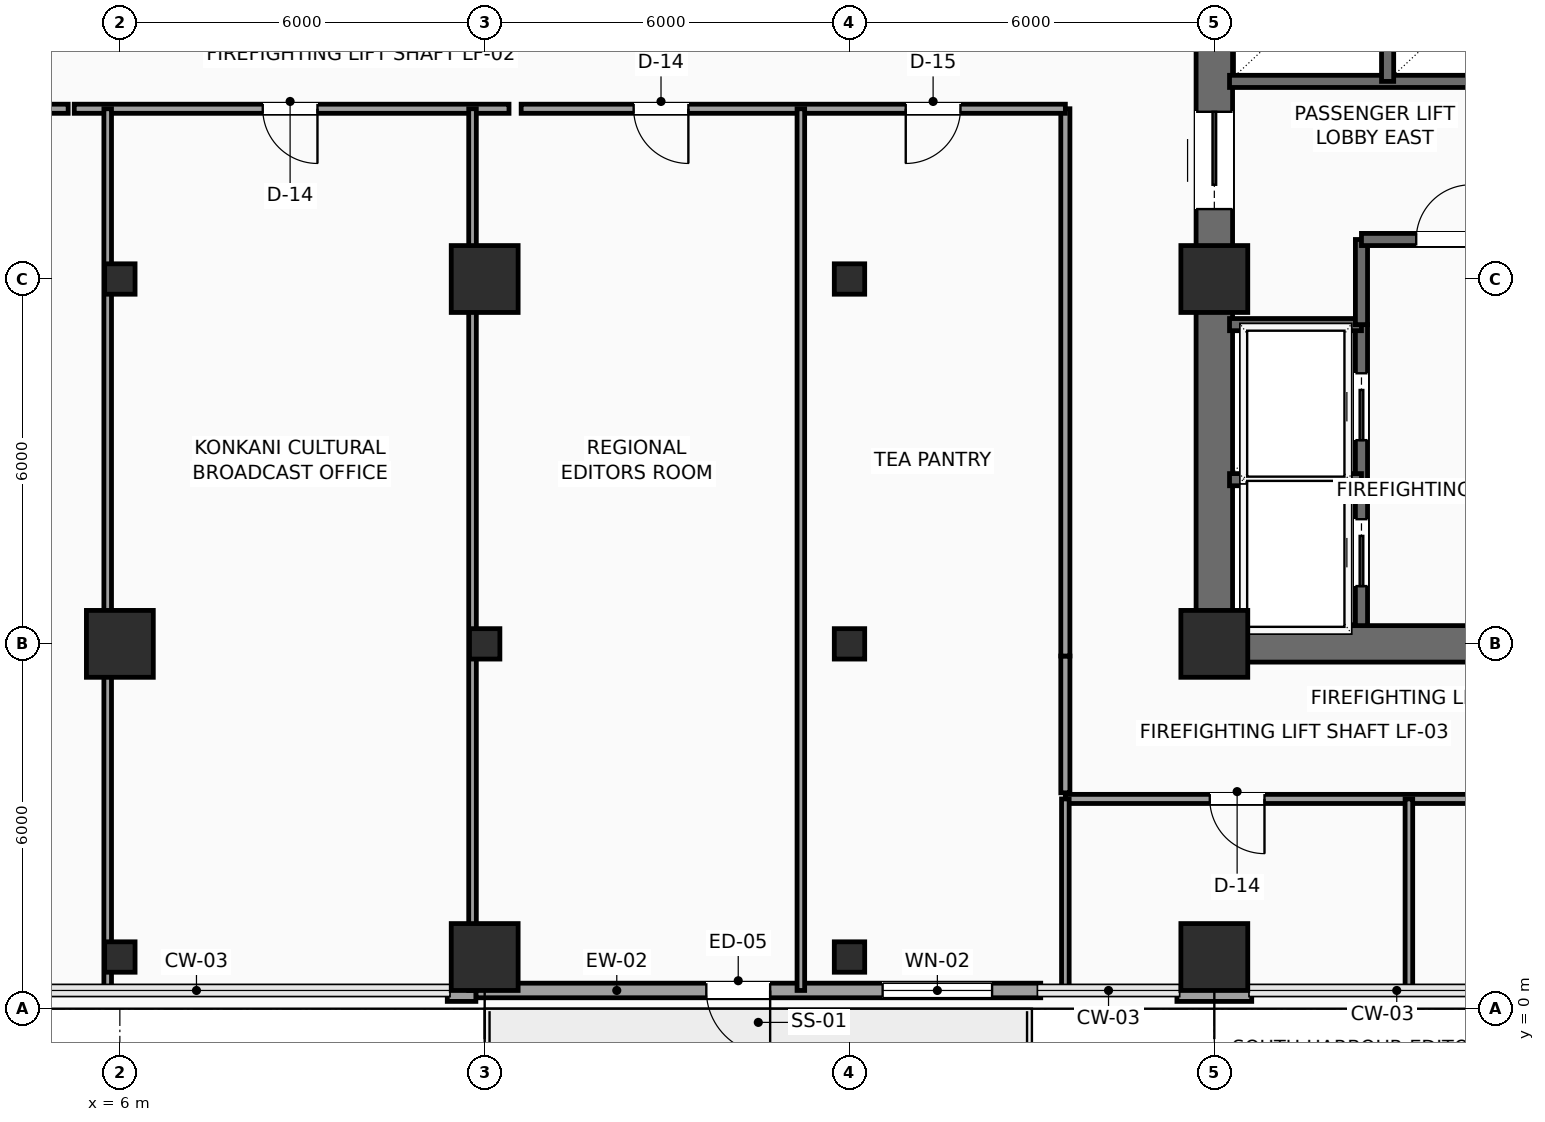
"""IFC4 building model, lengths in metres.
Left out: names, types, materials, properties, quantities, classifications, styles, units other than length and angle.
Written with IfcOpenShell. Run it as: python <this file> out.ifc"""

import sys

from ifc_helpers import new_model, si_unit, direction, frame, frame_2d, origin, origin_2d, place, context, subcontext, project, spatial, rectangle, hollow_rectangle, extrude, element, fill, save


model = new_model("IFC4")
c1 = context("Model", 3, precision=1e-05, world=origin(), true_north=direction((0.0, 1.0)))
c2 = subcontext(c1, "Body", "Model", "MODEL_VIEW")
j1 = project(units=[si_unit("LENGTHUNIT", "METRE"), si_unit("PLANEANGLEUNIT", "RADIAN")], contexts=[c1])
p1 = place(None, origin())
s1 = spatial("IfcSite", under=j1, at=p1, CompositionType="ELEMENT")
p2 = place(p1, origin())
s2 = spatial("IfcBuilding", under=s1, at=p2, CompositionType="ELEMENT")
p3 = place(p2, frame((0.0, 0.0, 99.6)))
s3 = spatial("IfcBuildingStorey", under=s2, at=p3, CompositionType="ELEMENT", Elevation=99.6)
for number, where, z_axis, x_axis in (
    (1, (24.0, 6.0, 0.0), (0.0, 0.0, 1.0), (1.0, 0.0, 0.0)),
    (2, (24.0, 12.0, 0.0), (0.0, 0.0, 1.0), (1.0, 0.0, 0.0)),
):
    element("IfcColumn", number, at=place(p3, frame(where, z_axis=z_axis, x_axis=x_axis)), inside=s3, PredefinedType="COLUMN", context=c2, shape_type="SweptSolid", body=[
        extrude(rectangle(XDim=1.1, YDim=1.1, at=origin_2d()), origin(), (0.0, 0.0, 1.0), 3.75),
    ])
p4 = place(p3, frame((6.0, 0.85, 0.0), z_axis=(0.0, 0.0, 1.0), x_axis=(1.0, 0.0, 0.0)))
e3 = element("IfcColumn", 3, at=p4, inside=s3, PredefinedType="COLUMN", context=c2, shape_type="SweptSolid", body=[
    extrude(hollow_rectangle(XDim=0.5, YDim=0.5, WallThickness=0.025, InnerFilletRadius=0.025, OuterFilletRadius=0.04, at=origin_2d()), origin(), (0.0, 0.0, 1.0), 3.75),
])
p5 = place(p3, frame((6.0, 6.0, 0.0), z_axis=(0.0, 0.0, 1.0), x_axis=(1.0, 0.0, 0.0)))
e4 = element("IfcColumn", 4, at=p5, inside=s3, PredefinedType="COLUMN", context=c2, shape_type="SweptSolid", body=[
    extrude(rectangle(XDim=1.1, YDim=1.1, at=origin_2d()), origin(), (0.0, 0.0, 1.0), 3.75),
])
p6 = place(p3, frame((6.0, 12.0, 0.0), z_axis=(0.0, 0.0, 1.0), x_axis=(1.0, 0.0, 0.0)))
e5 = element("IfcColumn", 5, at=p6, inside=s3, PredefinedType="COLUMN", context=c2, shape_type="SweptSolid", body=[
    extrude(hollow_rectangle(XDim=0.5, YDim=0.5, WallThickness=0.025, InnerFilletRadius=0.025, OuterFilletRadius=0.04, at=origin_2d()), origin(), (0.0, 0.0, 1.0), 3.75),
])
p7 = place(p3, frame((12.0, 0.85, 0.0), z_axis=(0.0, 0.0, 1.0), x_axis=(1.0, 0.0, 0.0)))
e6 = element("IfcColumn", 6, at=p7, inside=s3, PredefinedType="COLUMN", context=c2, shape_type="SweptSolid", body=[
    extrude(rectangle(XDim=1.1, YDim=1.1, at=origin_2d()), origin(), (0.0, 0.0, 1.0), 3.75),
])
p8 = place(p3, frame((12.0, 6.0, 0.0), z_axis=(0.0, 0.0, 1.0), x_axis=(1.0, 0.0, 0.0)))
e7 = element("IfcColumn", 7, at=p8, inside=s3, PredefinedType="COLUMN", context=c2, shape_type="SweptSolid", body=[
    extrude(hollow_rectangle(XDim=0.5, YDim=0.5, WallThickness=0.025, InnerFilletRadius=0.025, OuterFilletRadius=0.04, at=origin_2d()), origin(), (0.0, 0.0, 1.0), 3.75),
])
p9 = place(p3, frame((12.0, 12.0, 0.0), z_axis=(0.0, 0.0, 1.0), x_axis=(1.0, 0.0, 0.0)))
e8 = element("IfcColumn", 8, at=p9, inside=s3, PredefinedType="COLUMN", context=c2, shape_type="SweptSolid", body=[
    extrude(rectangle(XDim=1.1, YDim=1.1, at=origin_2d()), origin(), (0.0, 0.0, 1.0), 3.75),
])
for number, where, z_axis, x_axis in (
    (9, (18.0, 0.85, 0.0), (0.0, 0.0, 1.0), (1.0, 0.0, 0.0)),
    (10, (18.0, 6.0, 0.0), (0.0, 0.0, 1.0), (1.0, 0.0, 0.0)),
    (11, (18.0, 12.0, 0.0), (0.0, 0.0, 1.0), (1.0, 0.0, 0.0)),
):
    element("IfcColumn", number, at=place(p3, frame(where, z_axis=z_axis, x_axis=x_axis)), inside=s3, PredefinedType="COLUMN", context=c2, shape_type="SweptSolid", body=[
        extrude(hollow_rectangle(XDim=0.5, YDim=0.5, WallThickness=0.025, InnerFilletRadius=0.025, OuterFilletRadius=0.04, at=origin_2d()), origin(), (0.0, 0.0, 1.0), 3.75),
    ])
p10 = place(p3, frame((24.0, 0.85, 0.0), z_axis=(0.0, 0.0, 1.0), x_axis=(1.0, 0.0, 0.0)))
e12 = element("IfcColumn", 12, at=p10, inside=s3, PredefinedType="COLUMN", context=c2, shape_type="SweptSolid", body=[
    extrude(rectangle(XDim=1.1, YDim=1.1, at=origin_2d()), origin(), (0.0, 0.0, 1.0), 3.75),
])
p11 = place(p3, frame((21.145, 0.3, 0.0), z_axis=(0.0, 0.0, 1.0), x_axis=(-1.0, 0.0, 0.0)))
e13 = element("IfcWall", 13, at=p11, inside=s3, PredefinedType="SOLIDWALL", context=c2, shape_type="SweptSolid", body=[
    extrude(rectangle(XDim=9.29, YDim=0.24, at=frame_2d((4.645, 0.0))), origin(), (0.0, 0.0, 1.0), 3.525),
])
p12 = place(p11, frame((4.45, 0.0, 0.0)))
e14 = element("IfcOpeningElement", 14, at=p12, cuts=e13, PredefinedType="OPENING", context=c2, shape_type="SweptSolid", body=[
    extrude(rectangle(XDim=1.05, YDim=2.2, at=frame_2d((0.525, 1.1))), frame((0.0, 0.13, 0.0), z_axis=(0.0, -1.0, 0.0), x_axis=(1.0, 0.0, 0.0)), (0.0, 0.0, 1.0), 0.26),
])
p13 = place(p11, frame((0.8, 0.0, 0.85)))
e15 = element("IfcOpeningElement", 15, at=p13, cuts=e13, PredefinedType="OPENING", context=c2, shape_type="SweptSolid", body=[
    extrude(rectangle(XDim=1.8, YDim=2.1, at=frame_2d((0.9, 1.05))), frame((0.0, 0.13, 0.0), z_axis=(0.0, -1.0, 0.0), x_axis=(1.0, 0.0, 0.0)), (0.0, 0.0, 1.0), 0.26),
])
p14 = place(p3, frame((24.615, 0.24, 0.0), z_axis=(0.0, 0.0, 1.0), x_axis=(-1.0, 0.0, 0.0)))
e16 = element("IfcWall", 16, at=p14, inside=s3, PredefinedType="SOLIDWALL", context=c2, shape_type="SweptSolid", body=[
    extrude(rectangle(XDim=1.23, YDim=0.24, at=frame_2d((0.615, 0.0))), origin(), (0.0, 0.0, 1.0), 3.525),
])
p15 = place(p3, frame((11.855, 0.24, 0.0), z_axis=(0.0, 0.0, 1.0), x_axis=(-1.0, 0.0, 0.0)))
e17 = element("IfcWall", 17, at=p15, inside=s3, PredefinedType="SOLIDWALL", context=c2, shape_type="SweptSolid", body=[
    extrude(rectangle(XDim=0.47, YDim=0.24, at=frame_2d((0.235, 0.0))), origin(), (0.0, 0.0, 1.0), 3.525),
])
p16 = place(p3, frame((24.0, 6.0, 0.0), z_axis=(0.0, 0.0, 1.0), x_axis=(1.0, 0.0, 0.0)))
e18 = element("IfcWall", 18, at=p16, inside=s3, PredefinedType="SHEAR", context=c2, shape_type="SweptSolid", body=[
    extrude(rectangle(XDim=9.6, YDim=0.6, at=frame_2d((4.8, 0.0))), origin(), (0.0, 0.0, 1.0), 3.525),
])
p17 = place(p3, frame((24.0, 6.0, 0.0), z_axis=(0.0, 0.0, 1.0), x_axis=(0.0, 1.0, 0.0)))
e19 = element("IfcWall", 19, at=p17, inside=s3, PredefinedType="SHEAR", context=c2, shape_type="SweptSolid", body=[
    extrude(rectangle(XDim=12.0, YDim=0.6, at=frame_2d((6.0, 0.0))), origin(), (0.0, 0.0, 1.0), 3.525),
])
p18 = place(p17, frame((7.15, 0.0, 0.0)))
e20 = element("IfcOpeningElement", 20, at=p18, cuts=e19, PredefinedType="OPENING", context=c2, shape_type="SweptSolid", body=[
    extrude(rectangle(XDim=1.6, YDim=2.3, at=frame_2d((0.8, 1.15))), frame((0.0, 0.31, 0.0), z_axis=(0.0, -1.0, 0.0), x_axis=(1.0, 0.0, 0.0)), (0.0, 0.0, 1.0), 0.62),
])
p19 = place(p3, frame((26.42, 6.3, 0.0), z_axis=(0.0, 0.0, 1.0), x_axis=(0.0, 1.0, 0.0)))
e21 = element("IfcWall", 21, at=p19, inside=s3, PredefinedType="SHEAR", context=c2, shape_type="SweptSolid", body=[
    extrude(rectangle(XDim=4.95, YDim=0.2, at=frame_2d((2.475, 0.0))), origin(), (0.0, 0.0, 1.0), 3.525),
])
p20 = place(p19, frame((0.65, 0.0, 0.0)))
e22 = element("IfcOpeningElement", 22, at=p20, cuts=e21, PredefinedType="OPENING", context=c2, shape_type="SweptSolid", body=[
    extrude(rectangle(XDim=1.1, YDim=2.2, at=frame_2d((0.55, 1.1))), frame((0.0, 0.11, 0.0), z_axis=(0.0, -1.0, 0.0), x_axis=(1.0, 0.0, 0.0)), (0.0, 0.0, 1.0), 0.22),
])
p21 = place(p19, frame((3.05, 0.0, 0.0)))
e23 = element("IfcOpeningElement", 23, at=p21, cuts=e21, PredefinedType="OPENING", context=c2, shape_type="SweptSolid", body=[
    extrude(rectangle(XDim=1.1, YDim=2.2, at=frame_2d((0.55, 1.1))), frame((0.0, 0.11, 0.0), z_axis=(0.0, -1.0, 0.0), x_axis=(1.0, 0.0, 0.0)), (0.0, 0.0, 1.0), 0.22),
])
for number, where, z_axis, x_axis in (
    (24, (24.25, 8.7, 0.0), (0.0, 0.0, 1.0), (1.0, 0.0, 0.0)),
    (25, (24.25, 11.25, 0.0), (0.0, 0.0, 1.0), (1.0, 0.0, 0.0)),
):
    element("IfcWall", number, at=place(p3, frame(where, z_axis=z_axis, x_axis=x_axis)), inside=s3, PredefinedType="SHEAR", context=c2, shape_type="SweptSolid", body=[
        extrude(rectangle(XDim=2.17, YDim=0.2, at=frame_2d((1.085, 0.0))), origin(), (0.0, 0.0, 1.0), 3.525),
    ])
p22 = place(p3, frame((26.42, 11.25, 0.0), z_axis=(0.0, 0.0, 1.0), x_axis=(0.0, 1.0, 0.0)))
e26 = element("IfcWall", 26, at=p22, inside=s3, PredefinedType="SHEAR", context=c2, shape_type="SweptSolid", body=[
    extrude(rectangle(XDim=1.4, YDim=0.2, at=frame_2d((0.7, 0.0))), origin(), (0.0, 0.0, 1.0), 3.525),
])
p23 = place(p3, frame((26.42, 12.65, 0.0), z_axis=(0.0, 0.0, 1.0), x_axis=(1.0, 0.0, 0.0)))
e27 = element("IfcWall", 27, at=p23, inside=s3, PredefinedType="SHEAR", context=c2, shape_type="SweptSolid", body=[
    extrude(rectangle(XDim=2.84, YDim=0.2, at=frame_2d((1.42, 0.0))), origin(), (0.0, 0.0, 1.0), 3.525),
])
p24 = place(p23, frame((0.9, 0.0, 0.0)))
e28 = element("IfcOpeningElement", 28, at=p24, cuts=e27, PredefinedType="OPENING", context=c2, shape_type="SweptSolid", body=[
    extrude(rectangle(XDim=0.9, YDim=2.15, at=frame_2d((0.45, 1.075))), frame((0.0, 0.11, 0.0), z_axis=(0.0, -1.0, 0.0), x_axis=(1.0, 0.0, 0.0)), (0.0, 0.0, 1.0), 0.22),
])
p25 = place(p3, frame((24.25, 15.25, 0.0), z_axis=(0.0, 0.0, 1.0), x_axis=(1.0, 0.0, 0.0)))
e29 = element("IfcWall", 29, at=p25, inside=s3, PredefinedType="SHEAR", context=c2, shape_type="SweptSolid", body=[
    extrude(rectangle(XDim=5.2, YDim=0.2, at=frame_2d((2.6, 0.0))), origin(), (0.0, 0.0, 1.0), 3.525),
])
p26 = place(p3, frame((26.85, 15.25, 0.0), z_axis=(0.0, 0.0, 1.0), x_axis=(0.0, 1.0, 0.0)))
e30 = element("IfcWall", 30, at=p26, inside=s3, PredefinedType="SHEAR", context=c2, shape_type="SweptSolid", body=[
    extrude(rectangle(XDim=2.4, YDim=0.2, at=frame_2d((1.2, 0.0))), origin(), (0.0, 0.0, 1.0), 3.525),
])
p27 = place(p3, frame((36.15, 3.45, 0.0), z_axis=(0.0, 0.0, 1.0), x_axis=(-1.0, 0.0, 0.0)))
e31 = element("IfcWall", 31, at=p27, inside=s3, PredefinedType="PARTITIONING", context=c2, shape_type="SweptSolid", body=[
    extrude(rectangle(XDim=14.6, YDim=0.15, at=frame_2d((7.3, 0.0))), origin(), (0.0, 0.0, 1.0), 3.067),
])
p28 = place(p27, frame((11.325, 0.0, 0.0)))
e32 = element("IfcOpeningElement", 32, at=p28, cuts=e31, PredefinedType="OPENING", context=c2, shape_type="SweptSolid", body=[
    extrude(rectangle(XDim=0.9, YDim=2.1, at=frame_2d((0.45, 1.05))), frame((0.0, 0.085, 0.0), z_axis=(0.0, -1.0, 0.0), x_axis=(1.0, 0.0, 0.0)), (0.0, 0.0, 1.0), 0.17),
])
p29 = place(p27, frame((5.7, 0.0, 0.0)))
e33 = element("IfcOpeningElement", 33, at=p29, cuts=e31, PredefinedType="OPENING", context=c2, shape_type="SweptSolid", body=[
    extrude(rectangle(XDim=0.9, YDim=2.1, at=frame_2d((0.45, 1.05))), frame((0.0, 0.085, 0.0), z_axis=(0.0, -1.0, 0.0), x_axis=(1.0, 0.0, 0.0)), (0.0, 0.0, 1.0), 0.17),
])
p30 = place(p3, frame((21.55, 3.55, 0.0), z_axis=(0.0, 0.0, 1.0), x_axis=(0.0, 1.0, 0.0)))
e34 = element("IfcWall", 34, at=p30, inside=s3, PredefinedType="PARTITIONING", context=c2, shape_type="SweptSolid", body=[
    extrude(rectangle(XDim=2.25, YDim=0.15, at=frame_2d((1.125, 0.0))), origin(), (0.0, 0.0, 1.0), 3.525),
])
p31 = place(p3, frame((21.55, 5.8, 0.0), z_axis=(0.0, 0.0, 1.0), x_axis=(0.0, 1.0, 0.0)))
e35 = element("IfcWall", 35, at=p31, inside=s3, PredefinedType="PARTITIONING", context=c2, shape_type="SweptSolid", body=[
    extrude(rectangle(XDim=9.0, YDim=0.15, at=frame_2d((4.5, 0.0))), origin(), (0.0, 0.0, 1.0), 3.525),
])
p32 = place(p3, frame((21.55, 14.8, 0.0), z_axis=(0.0, 0.0, 1.0), x_axis=(-1.0, 0.0, 0.0)))
e36 = element("IfcWall", 36, at=p32, inside=s3, PredefinedType="PARTITIONING", context=c2, shape_type="SweptSolid", body=[
    extrude(rectangle(XDim=8.95, YDim=0.15, at=frame_2d((4.475, 0.0))), origin(), (0.0, 0.0, 1.0), 3.067),
])
p33 = place(p32, frame((6.2, 0.0, 0.0)))
e37 = element("IfcOpeningElement", 37, at=p33, cuts=e36, PredefinedType="OPENING", context=c2, shape_type="SweptSolid", body=[
    extrude(rectangle(XDim=0.9, YDim=2.1, at=frame_2d((0.45, 1.05))), frame((0.0, 0.085, 0.0), z_axis=(0.0, -1.0, 0.0), x_axis=(1.0, 0.0, 0.0)), (0.0, 0.0, 1.0), 0.17),
])
p34 = place(p32, frame((1.725, 0.0, 0.0)))
e38 = element("IfcOpeningElement", 38, at=p34, cuts=e36, PredefinedType="OPENING", context=c2, shape_type="SweptSolid", body=[
    extrude(rectangle(XDim=0.9, YDim=2.1, at=frame_2d((0.45, 1.05))), frame((0.0, 0.085, 0.0), z_axis=(0.0, -1.0, 0.0), x_axis=(1.0, 0.0, 0.0)), (0.0, 0.0, 1.0), 0.17),
])
p35 = place(p3, frame((12.4, 14.8, 0.0), z_axis=(0.0, 0.0, 1.0), x_axis=(-1.0, 0.0, 0.0)))
e39 = element("IfcWall", 39, at=p35, inside=s3, PredefinedType="PARTITIONING", context=c2, shape_type="SweptSolid", body=[
    extrude(rectangle(XDim=7.15, YDim=0.15, at=frame_2d((3.575, 0.0))), origin(), (0.0, 0.0, 1.0), 3.067),
])
p36 = place(p35, frame((3.15, 0.0, 0.0)))
e40 = element("IfcOpeningElement", 40, at=p36, cuts=e39, PredefinedType="OPENING", context=c2, shape_type="SweptSolid", body=[
    extrude(rectangle(XDim=0.9, YDim=2.1, at=frame_2d((0.45, 1.05))), frame((0.0, 0.085, 0.0), z_axis=(0.0, -1.0, 0.0), x_axis=(1.0, 0.0, 0.0)), (0.0, 0.0, 1.0), 0.17),
])
p37 = place(p3, frame((5.15, 14.8, 0.0), z_axis=(0.0, 0.0, 1.0), x_axis=(-1.0, 0.0, 0.0)))
e41 = element("IfcWall", 41, at=p37, inside=s3, PredefinedType="PARTITIONING", context=c2, shape_type="SweptSolid", body=[
    extrude(rectangle(XDim=1.95, YDim=0.15, at=frame_2d((0.975, 0.0))), origin(), (0.0, 0.0, 1.0), 3.067),
])
p38 = place(p37, frame((0.525, 0.0, 0.0)))
e42 = element("IfcOpeningElement", 42, at=p38, cuts=e41, PredefinedType="OPENING", context=c2, shape_type="SweptSolid", body=[
    extrude(rectangle(XDim=0.9, YDim=2.1, at=frame_2d((0.45, 1.05))), frame((0.0, 0.085, 0.0), z_axis=(0.0, -1.0, 0.0), x_axis=(1.0, 0.0, 0.0)), (0.0, 0.0, 1.0), 0.17),
])
for number, where, z_axis, x_axis in (
    (43, (5.8, 0.3, 0.0), (0.0, 0.0, 1.0), (0.0, 1.0, 0.0)),
    (44, (11.8, 0.3, 0.0), (0.0, 0.0, 1.0), (0.0, 1.0, 0.0)),
):
    element("IfcWall", number, at=place(p3, frame(where, z_axis=z_axis, x_axis=x_axis)), inside=s3, PredefinedType="PARTITIONING", context=c2, shape_type="SweptSolid", body=[
        extrude(rectangle(XDim=14.5, YDim=0.125, at=frame_2d((7.25, 0.0))), origin(), (0.0, 0.0, 1.0), 3.017),
    ])
p39 = place(p3, frame((17.2, 0.3, 0.0), z_axis=(0.0, 0.0, 1.0), x_axis=(0.0, 1.0, 0.0)))
e45 = element("IfcWall", 45, at=p39, inside=s3, PredefinedType="PARTITIONING", context=c2, shape_type="SweptSolid", body=[
    extrude(rectangle(XDim=14.5, YDim=0.125, at=frame_2d((7.25, 0.0))), origin(), (0.0, 0.0, 1.0), 3.525),
])
for number, where, z_axis, x_axis in (
    (46, (21.55, 0.3, 0.0), (0.0, 0.0, 1.0), (0.0, 1.0, 0.0)),
    (47, (27.2, 0.3, 0.0), (0.0, 0.0, 1.0), (0.0, 1.0, 0.0)),
):
    element("IfcWall", number, at=place(p3, frame(where, z_axis=z_axis, x_axis=x_axis)), inside=s3, PredefinedType="PARTITIONING", context=c2, shape_type="SweptSolid", body=[
        extrude(rectangle(XDim=3.15, YDim=0.125, at=frame_2d((1.575, 0.0))), origin(), (0.0, 0.0, 1.0), 3.525),
    ])
p40 = place(p12, origin())
e48 = element("IfcDoor", 48, at=p40, inside=s3, OperationType="SINGLE_SWING_LEFT", PredefinedType="DOOR", context=c2, shape_type="SweptSolid", body=[
    extrude(rectangle(XDim=1.05, YDim=2.2, at=frame_2d((0.525, 1.1))), frame((0.0, 0.025, 0.0), z_axis=(0.0, -1.0, 0.0), x_axis=(1.0, 0.0, 0.0)), (0.0, 0.0, 1.0), 0.05),
])
fill(e14, e48)
p41 = place(p13, origin())
e49 = element("IfcWindow", 49, at=p41, inside=s3, PartitioningType="SINGLE_PANEL", PredefinedType="WINDOW", context=c2, shape_type="SweptSolid", body=[
    extrude(rectangle(XDim=1.8, YDim=2.1, at=frame_2d((0.9, 1.05))), frame((0.0, 0.03, 0.0), z_axis=(0.0, -1.0, 0.0), x_axis=(1.0, 0.0, 0.0)), (0.0, 0.0, 1.0), 0.06),
])
fill(e15, e49)
p42 = place(p18, origin())
e50 = element("IfcDoor", 50, at=p42, inside=s3, OperationType="DOUBLE_DOOR_SLIDING", PredefinedType="DOOR", context=c2, shape_type="SweptSolid", body=[
    extrude(rectangle(XDim=1.6, YDim=2.3, at=frame_2d((0.8, 1.15))), frame((0.0, 0.025, 0.0), z_axis=(0.0, -1.0, 0.0), x_axis=(1.0, 0.0, 0.0)), (0.0, 0.0, 1.0), 0.05),
])
fill(e20, e50)
p43 = place(p20, origin())
e51 = element("IfcDoor", 51, at=p43, inside=s3, OperationType="SLIDING_TO_LEFT", PredefinedType="DOOR", context=c2, shape_type="SweptSolid", body=[
    extrude(rectangle(XDim=1.1, YDim=2.2, at=frame_2d((0.55, 1.1))), frame((0.0, 0.025, 0.0), z_axis=(0.0, -1.0, 0.0), x_axis=(1.0, 0.0, 0.0)), (0.0, 0.0, 1.0), 0.05),
])
fill(e22, e51)
p44 = place(p21, origin())
e52 = element("IfcDoor", 52, at=p44, inside=s3, OperationType="SLIDING_TO_LEFT", PredefinedType="DOOR", context=c2, shape_type="SweptSolid", body=[
    extrude(rectangle(XDim=1.1, YDim=2.2, at=frame_2d((0.55, 1.1))), frame((0.0, 0.025, 0.0), z_axis=(0.0, -1.0, 0.0), x_axis=(1.0, 0.0, 0.0)), (0.0, 0.0, 1.0), 0.05),
])
fill(e23, e52)
p45 = place(p24, origin())
e53 = element("IfcDoor", 53, at=p45, inside=s3, OperationType="SINGLE_SWING_RIGHT", PredefinedType="DOOR", context=c2, shape_type="SweptSolid", body=[
    extrude(rectangle(XDim=0.9, YDim=2.15, at=frame_2d((0.45, 1.075))), frame((0.0, 0.025, 0.0), z_axis=(0.0, -1.0, 0.0), x_axis=(1.0, 0.0, 0.0)), (0.0, 0.0, 1.0), 0.05),
])
fill(e28, e53)
p46 = place(p28, origin())
e54 = element("IfcDoor", 54, at=p46, inside=s3, OperationType="SINGLE_SWING_LEFT", PredefinedType="DOOR", context=c2, shape_type="SweptSolid", body=[
    extrude(rectangle(XDim=0.9, YDim=2.1, at=frame_2d((0.45, 1.05))), frame((0.0, 0.025, 0.0), z_axis=(0.0, -1.0, 0.0), x_axis=(1.0, 0.0, 0.0)), (0.0, 0.0, 1.0), 0.05),
])
fill(e32, e54)
p47 = place(p33, origin())
e55 = element("IfcDoor", 55, at=p47, inside=s3, OperationType="SINGLE_SWING_LEFT", PredefinedType="DOOR", context=c2, shape_type="SweptSolid", body=[
    extrude(rectangle(XDim=0.9, YDim=2.1, at=frame_2d((0.45, 1.05))), frame((0.0, 0.025, 0.0), z_axis=(0.0, -1.0, 0.0), x_axis=(1.0, 0.0, 0.0)), (0.0, 0.0, 1.0), 0.05),
])
fill(e37, e55)
p48 = place(p34, origin())
e56 = element("IfcDoor", 56, at=p48, inside=s3, OperationType="SINGLE_SWING_RIGHT", PredefinedType="DOOR", context=c2, shape_type="SweptSolid", body=[
    extrude(rectangle(XDim=0.9, YDim=2.1, at=frame_2d((0.45, 1.05))), frame((0.0, 0.025, 0.0), z_axis=(0.0, -1.0, 0.0), x_axis=(1.0, 0.0, 0.0)), (0.0, 0.0, 1.0), 0.05),
])
fill(e38, e56)
p49 = place(p36, origin())
e57 = element("IfcDoor", 57, at=p49, inside=s3, OperationType="SINGLE_SWING_LEFT", PredefinedType="DOOR", context=c2, shape_type="SweptSolid", body=[
    extrude(rectangle(XDim=0.9, YDim=2.1, at=frame_2d((0.45, 1.05))), frame((0.0, 0.025, 0.0), z_axis=(0.0, -1.0, 0.0), x_axis=(1.0, 0.0, 0.0)), (0.0, 0.0, 1.0), 0.05),
])
fill(e40, e57)
save(model, sys.argv[1])
